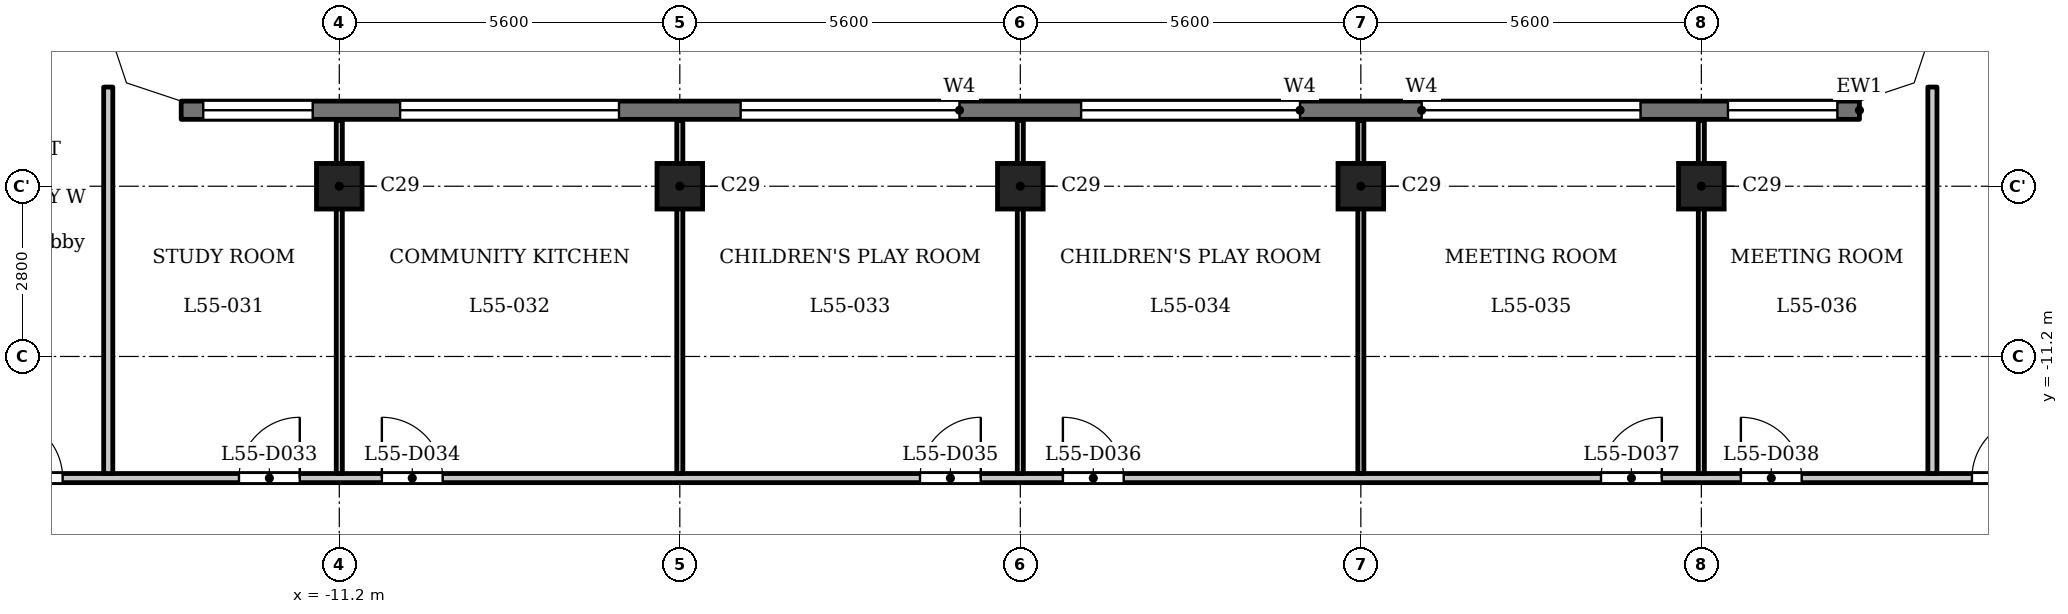
"""IFC4 building model, lengths in metres.
Left out: names, types, materials, properties, quantities, classifications, styles, units other than length and angle.
Written with IfcOpenShell. Run it as: python <this file> out.ifc"""

import sys

from ifc_helpers import new_model, si_unit, direction, frame, frame_2d, origin, origin_2d, place, context, subcontext, project, spatial, polyline, rectangle, outline, extrude, element, fill, save


model = new_model("IFC4")
c1 = context("Model", 3, precision=1e-05, world=origin(), true_north=direction((0.0, 1.0)))
c2 = subcontext(c1, "Body", "Model", "MODEL_VIEW")
j1 = project(units=[si_unit("LENGTHUNIT", "METRE"), si_unit("PLANEANGLEUNIT", "RADIAN")], contexts=[c1])
p1 = place(None, origin())
s1 = spatial("IfcSite", under=j1, at=p1, CompositionType="ELEMENT")
p2 = place(p1, origin())
s2 = spatial("IfcBuilding", under=s1, at=p2, CompositionType="ELEMENT")
p3 = place(p2, frame((0.0, 0.0, 213.4)))
s3 = spatial("IfcBuildingStorey", under=s2, at=p3, CompositionType="ELEMENT", Elevation=213.4)
for number, where, z_axis, x_axis in (
    (1, (-11.2, -8.4, 0.0), (0.0, 0.0, 1.0), (1.0, 0.0, 0.0)),
    (2, (-5.6, -8.4, 0.0), (0.0, 0.0, 1.0), (1.0, 0.0, 0.0)),
    (3, (0.0, -8.4, 0.0), (0.0, 0.0, 1.0), (1.0, 0.0, 0.0)),
    (4, (5.6, -8.4, 0.0), (0.0, 0.0, 1.0), (1.0, 0.0, 0.0)),
    (5, (11.2, -8.4, 0.0), (0.0, 0.0, 1.0), (1.0, 0.0, 0.0)),
):
    element("IfcColumn", number, at=place(p3, frame(where, z_axis=z_axis, x_axis=x_axis)), inside=s3, PredefinedType="COLUMN", context=c2, shape_type="SweptSolid", body=[
        extrude(rectangle(XDim=0.75, YDim=0.75, at=origin_2d()), origin(), (0.0, 0.0, 1.0), 3.5),
    ])
p4 = place(p3, frame((13.8, -7.15, 0.0), z_axis=(0.0, 0.0, 1.0), x_axis=(-1.0, 0.0, 0.0)))
e6 = element("IfcWall", 6, at=p4, inside=s3, PredefinedType="SOLIDWALL", context=c2, shape_type="SweptSolid", body=[
    extrude(rectangle(XDim=27.6, YDim=0.3, at=frame_2d((13.8, 0.0))), origin(), (0.0, 0.0, 1.0), 3.2),
])
p5 = place(p4, frame((0.363, 0.0, 0.9)))
e7 = element("IfcOpeningElement", 7, at=p5, cuts=e6, PredefinedType="OPENING", context=c2, shape_type="SweptSolid", body=[
    extrude(rectangle(XDim=1.8, YDim=1.25, at=frame_2d((0.9, 0.625))), frame((0.0, 0.16, 0.0), z_axis=(0.0, -1.0, 0.0), x_axis=(1.0, 0.0, 0.0)), (0.0, 0.0, 1.0), 0.32),
])
p6 = place(p4, frame((3.6, 0.0, 1.2)))
e8 = element("IfcOpeningElement", 8, at=p6, cuts=e6, PredefinedType="OPENING", context=c2, shape_type="SweptSolid", body=[
    extrude(rectangle(XDim=3.6, YDim=0.95, at=frame_2d((1.8, 0.475))), frame((0.0, 0.16, 0.0), z_axis=(0.0, -1.0, 0.0), x_axis=(1.0, 0.0, 0.0)), (0.0, 0.0, 1.0), 0.32),
])
p7 = place(p4, frame((9.2, 0.0, 1.2)))
e9 = element("IfcOpeningElement", 9, at=p7, cuts=e6, PredefinedType="OPENING", context=c2, shape_type="SweptSolid", body=[
    extrude(rectangle(XDim=3.6, YDim=0.95, at=frame_2d((1.8, 0.475))), frame((0.0, 0.16, 0.0), z_axis=(0.0, -1.0, 0.0), x_axis=(1.0, 0.0, 0.0)), (0.0, 0.0, 1.0), 0.32),
])
p8 = place(p4, frame((14.8, 0.0, 1.2)))
e10 = element("IfcOpeningElement", 10, at=p8, cuts=e6, PredefinedType="OPENING", context=c2, shape_type="SweptSolid", body=[
    extrude(rectangle(XDim=3.6, YDim=0.95, at=frame_2d((1.8, 0.475))), frame((0.0, 0.16, 0.0), z_axis=(0.0, -1.0, 0.0), x_axis=(1.0, 0.0, 0.0)), (0.0, 0.0, 1.0), 0.32),
])
p9 = place(p4, frame((20.4, 0.0, 1.2)))
e11 = element("IfcOpeningElement", 11, at=p9, cuts=e6, PredefinedType="OPENING", context=c2, shape_type="SweptSolid", body=[
    extrude(rectangle(XDim=3.6, YDim=0.95, at=frame_2d((1.8, 0.475))), frame((0.0, 0.16, 0.0), z_axis=(0.0, -1.0, 0.0), x_axis=(1.0, 0.0, 0.0)), (0.0, 0.0, 1.0), 0.32),
])
p10 = place(p4, frame((25.438, 0.0, 0.9)))
e12 = element("IfcOpeningElement", 12, at=p10, cuts=e6, PredefinedType="OPENING", context=c2, shape_type="SweptSolid", body=[
    extrude(rectangle(XDim=1.8, YDim=1.25, at=frame_2d((0.9, 0.625))), frame((0.0, 0.16, 0.0), z_axis=(0.0, -1.0, 0.0), x_axis=(1.0, 0.0, 0.0)), (0.0, 0.0, 1.0), 0.32),
])
p11 = place(p3, frame((-17.4, -13.2, 0.0), z_axis=(0.0, 0.0, 1.0), x_axis=(1.0, 0.0, 0.0)))
e13 = element("IfcWall", 13, at=p11, inside=s3, PredefinedType="PARTITIONING", context=c2, shape_type="SweptSolid", body=[
    extrude(rectangle(XDim=34.8, YDim=0.15, at=frame_2d((17.4, 0.0))), origin(), (0.0, 0.0, 1.0), 3.2),
])
p12 = place(p11, frame((0.65, 0.0, 0.0)))
e14 = element("IfcOpeningElement", 14, at=p12, cuts=e13, PredefinedType="OPENING", context=c2, shape_type="SweptSolid", body=[
    extrude(rectangle(XDim=1.0, YDim=2.1, at=frame_2d((0.5, 1.05))), frame((0.0, 0.085, 0.0), z_axis=(0.0, -1.0, 0.0), x_axis=(1.0, 0.0, 0.0)), (0.0, 0.0, 1.0), 0.17),
])
p13 = place(p11, frame((33.05, 0.0, 0.0)))
e15 = element("IfcOpeningElement", 15, at=p13, cuts=e13, PredefinedType="OPENING", context=c2, shape_type="SweptSolid", body=[
    extrude(rectangle(XDim=1.0, YDim=2.1, at=frame_2d((0.5, 1.05))), frame((0.0, 0.085, 0.0), z_axis=(0.0, -1.0, 0.0), x_axis=(1.0, 0.0, 0.0)), (0.0, 0.0, 1.0), 0.17),
])
p14 = place(p11, frame((4.55, 0.0, 0.0)))
e16 = element("IfcOpeningElement", 16, at=p14, cuts=e13, PredefinedType="OPENING", context=c2, shape_type="SweptSolid", body=[
    extrude(rectangle(XDim=1.0, YDim=2.1, at=frame_2d((0.5, 1.05))), frame((0.0, 0.085, 0.0), z_axis=(0.0, -1.0, 0.0), x_axis=(1.0, 0.0, 0.0)), (0.0, 0.0, 1.0), 0.17),
])
p15 = place(p11, frame((6.9, 0.0, 0.0)))
e17 = element("IfcOpeningElement", 17, at=p15, cuts=e13, PredefinedType="OPENING", context=c2, shape_type="SweptSolid", body=[
    extrude(rectangle(XDim=1.0, YDim=2.1, at=frame_2d((0.5, 1.05))), frame((0.0, 0.085, 0.0), z_axis=(0.0, -1.0, 0.0), x_axis=(1.0, 0.0, 0.0)), (0.0, 0.0, 1.0), 0.17),
])
p16 = place(p11, frame((15.75, 0.0, 0.0)))
e18 = element("IfcOpeningElement", 18, at=p16, cuts=e13, PredefinedType="OPENING", context=c2, shape_type="SweptSolid", body=[
    extrude(rectangle(XDim=1.0, YDim=2.1, at=frame_2d((0.5, 1.05))), frame((0.0, 0.085, 0.0), z_axis=(0.0, -1.0, 0.0), x_axis=(1.0, 0.0, 0.0)), (0.0, 0.0, 1.0), 0.17),
])
p17 = place(p11, frame((18.1, 0.0, 0.0)))
e19 = element("IfcOpeningElement", 19, at=p17, cuts=e13, PredefinedType="OPENING", context=c2, shape_type="SweptSolid", body=[
    extrude(rectangle(XDim=1.0, YDim=2.1, at=frame_2d((0.5, 1.05))), frame((0.0, 0.085, 0.0), z_axis=(0.0, -1.0, 0.0), x_axis=(1.0, 0.0, 0.0)), (0.0, 0.0, 1.0), 0.17),
])
p18 = place(p11, frame((26.95, 0.0, 0.0)))
e20 = element("IfcOpeningElement", 20, at=p18, cuts=e13, PredefinedType="OPENING", context=c2, shape_type="SweptSolid", body=[
    extrude(rectangle(XDim=1.0, YDim=2.1, at=frame_2d((0.5, 1.05))), frame((0.0, 0.085, 0.0), z_axis=(0.0, -1.0, 0.0), x_axis=(1.0, 0.0, 0.0)), (0.0, 0.0, 1.0), 0.17),
])
p19 = place(p11, frame((29.25, 0.0, 0.0)))
e21 = element("IfcOpeningElement", 21, at=p19, cuts=e13, PredefinedType="OPENING", context=c2, shape_type="SweptSolid", body=[
    extrude(rectangle(XDim=1.0, YDim=2.1, at=frame_2d((0.5, 1.05))), frame((0.0, 0.085, 0.0), z_axis=(0.0, -1.0, 0.0), x_axis=(1.0, 0.0, 0.0)), (0.0, 0.0, 1.0), 0.17),
])
p20 = place(p3, frame((-15.0, -13.125, 0.0), z_axis=(0.0, 0.0, 1.0), x_axis=(0.0, 1.0, 0.0)))
e22 = element("IfcWall", 22, at=p20, inside=s3, PredefinedType="PARTITIONING", context=c2, shape_type="SweptSolid", body=[
    extrude(rectangle(XDim=6.356, YDim=0.15, at=frame_2d((3.178, 0.0))), origin(), (0.0, 0.0, 1.0), 3.2),
])
for number, where, z_axis, x_axis in (
    (23, (-11.2, -13.125, 0.0), (0.0, 0.0, 1.0), (0.0, 1.0, 0.0)),
    (24, (-5.6, -13.125, 0.0), (0.0, 0.0, 1.0), (0.0, 1.0, 0.0)),
    (25, (0.0, -13.125, 0.0), (0.0, 0.0, 1.0), (0.0, 1.0, 0.0)),
    (26, (5.6, -13.125, 0.0), (0.0, 0.0, 1.0), (0.0, 1.0, 0.0)),
    (27, (11.2, -13.125, 0.0), (0.0, 0.0, 1.0), (0.0, 1.0, 0.0)),
):
    element("IfcWall", number, at=place(p3, frame(where, z_axis=z_axis, x_axis=x_axis)), inside=s3, PredefinedType="PARTITIONING", context=c2, shape_type="SweptSolid", body=[
        extrude(rectangle(XDim=5.805, YDim=0.1, at=frame_2d((2.902, 0.0))), origin(), (0.0, 0.0, 1.0), 3.2),
    ])
p21 = place(p3, frame((15.0, -13.125, 0.0), z_axis=(0.0, 0.0, 1.0), x_axis=(0.0, 1.0, 0.0)))
e28 = element("IfcWall", 28, at=p21, inside=s3, PredefinedType="PARTITIONING", context=c2, shape_type="SweptSolid", body=[
    extrude(rectangle(XDim=6.356, YDim=0.15, at=frame_2d((3.178, 0.0))), origin(), (0.0, 0.0, 1.0), 3.2),
])
p22 = place(p3, origin())
e29 = element("IfcWall", 29, at=p22, inside=s3, PredefinedType="SOLIDWALL", context=c2, shape_type="SweptSolid", body=[
    extrude(outline(polyline([(14.937, -6.937), (15.3, -5.849), (15.3, -5.8), (15.0, -5.8), (14.7, -6.7), (13.8, -7.0), (13.8, -7.3), (13.849, -7.3), (14.937, -6.937)])), origin(), (0.0, 0.0, 1.0), 3.2),
])
e30 = element("IfcWall", 30, at=p22, inside=s3, PredefinedType="SOLIDWALL", context=c2, shape_type="SweptSolid", body=[
    extrude(outline(polyline([(-14.937, -6.937), (-13.849, -7.3), (-13.8, -7.3), (-13.8, -7.0), (-14.7, -6.7), (-15.0, -5.8), (-15.3, -5.8), (-15.3, -5.849), (-14.937, -6.937)])), origin(), (0.0, 0.0, 1.0), 3.2),
])
p23 = place(p12, origin())
e31 = element("IfcDoor", 31, at=p23, inside=s3, OperationType="SINGLE_SWING_RIGHT", PredefinedType="DOOR", context=c2, shape_type="SweptSolid", body=[
    extrude(rectangle(XDim=1.0, YDim=2.1, at=frame_2d((0.5, 1.05))), frame((0.0, 0.025, 0.0), z_axis=(0.0, -1.0, 0.0), x_axis=(1.0, 0.0, 0.0)), (0.0, 0.0, 1.0), 0.05),
])
fill(e14, e31)
p24 = place(p13, origin())
e32 = element("IfcDoor", 32, at=p24, inside=s3, OperationType="SINGLE_SWING_LEFT", PredefinedType="DOOR", context=c2, shape_type="SweptSolid", body=[
    extrude(rectangle(XDim=1.0, YDim=2.1, at=frame_2d((0.5, 1.05))), frame((0.0, 0.025, 0.0), z_axis=(0.0, -1.0, 0.0), x_axis=(1.0, 0.0, 0.0)), (0.0, 0.0, 1.0), 0.05),
])
fill(e15, e32)
p25 = place(p14, origin())
e33 = element("IfcDoor", 33, at=p25, inside=s3, OperationType="SINGLE_SWING_LEFT", PredefinedType="DOOR", context=c2, shape_type="SweptSolid", body=[
    extrude(rectangle(XDim=1.0, YDim=2.1, at=frame_2d((0.5, 1.05))), frame((0.0, 0.025, 0.0), z_axis=(0.0, -1.0, 0.0), x_axis=(1.0, 0.0, 0.0)), (0.0, 0.0, 1.0), 0.05),
])
fill(e16, e33)
p26 = place(p15, origin())
e34 = element("IfcDoor", 34, at=p26, inside=s3, OperationType="SINGLE_SWING_RIGHT", PredefinedType="DOOR", context=c2, shape_type="SweptSolid", body=[
    extrude(rectangle(XDim=1.0, YDim=2.1, at=frame_2d((0.5, 1.05))), frame((0.0, 0.025, 0.0), z_axis=(0.0, -1.0, 0.0), x_axis=(1.0, 0.0, 0.0)), (0.0, 0.0, 1.0), 0.05),
])
fill(e17, e34)
p27 = place(p16, origin())
e35 = element("IfcDoor", 35, at=p27, inside=s3, OperationType="SINGLE_SWING_LEFT", PredefinedType="DOOR", context=c2, shape_type="SweptSolid", body=[
    extrude(rectangle(XDim=1.0, YDim=2.1, at=frame_2d((0.5, 1.05))), frame((0.0, 0.025, 0.0), z_axis=(0.0, -1.0, 0.0), x_axis=(1.0, 0.0, 0.0)), (0.0, 0.0, 1.0), 0.05),
])
fill(e18, e35)
p28 = place(p17, origin())
e36 = element("IfcDoor", 36, at=p28, inside=s3, OperationType="SINGLE_SWING_RIGHT", PredefinedType="DOOR", context=c2, shape_type="SweptSolid", body=[
    extrude(rectangle(XDim=1.0, YDim=2.1, at=frame_2d((0.5, 1.05))), frame((0.0, 0.025, 0.0), z_axis=(0.0, -1.0, 0.0), x_axis=(1.0, 0.0, 0.0)), (0.0, 0.0, 1.0), 0.05),
])
fill(e19, e36)
p29 = place(p18, origin())
e37 = element("IfcDoor", 37, at=p29, inside=s3, OperationType="SINGLE_SWING_LEFT", PredefinedType="DOOR", context=c2, shape_type="SweptSolid", body=[
    extrude(rectangle(XDim=1.0, YDim=2.1, at=frame_2d((0.5, 1.05))), frame((0.0, 0.025, 0.0), z_axis=(0.0, -1.0, 0.0), x_axis=(1.0, 0.0, 0.0)), (0.0, 0.0, 1.0), 0.05),
])
fill(e20, e37)
p30 = place(p19, origin())
e38 = element("IfcDoor", 38, at=p30, inside=s3, OperationType="SINGLE_SWING_RIGHT", PredefinedType="DOOR", context=c2, shape_type="SweptSolid", body=[
    extrude(rectangle(XDim=1.0, YDim=2.1, at=frame_2d((0.5, 1.05))), frame((0.0, 0.025, 0.0), z_axis=(0.0, -1.0, 0.0), x_axis=(1.0, 0.0, 0.0)), (0.0, 0.0, 1.0), 0.05),
])
fill(e21, e38)
p31 = place(p5, origin())
e39 = element("IfcWindow", 39, at=p31, inside=s3, PartitioningType="SINGLE_PANEL", PredefinedType="WINDOW", context=c2, shape_type="SweptSolid", body=[
    extrude(rectangle(XDim=1.8, YDim=1.25, at=frame_2d((0.9, 0.625))), frame((0.0, 0.03, 0.0), z_axis=(0.0, -1.0, 0.0), x_axis=(1.0, 0.0, 0.0)), (0.0, 0.0, 1.0), 0.06),
])
fill(e7, e39)
p32 = place(p6, origin())
e40 = element("IfcWindow", 40, at=p32, inside=s3, PartitioningType="SINGLE_PANEL", PredefinedType="WINDOW", context=c2, shape_type="SweptSolid", body=[
    extrude(rectangle(XDim=3.6, YDim=0.95, at=frame_2d((1.8, 0.475))), frame((0.0, 0.03, 0.0), z_axis=(0.0, -1.0, 0.0), x_axis=(1.0, 0.0, 0.0)), (0.0, 0.0, 1.0), 0.06),
])
fill(e8, e40)
p33 = place(p7, origin())
e41 = element("IfcWindow", 41, at=p33, inside=s3, PartitioningType="SINGLE_PANEL", PredefinedType="WINDOW", context=c2, shape_type="SweptSolid", body=[
    extrude(rectangle(XDim=3.6, YDim=0.95, at=frame_2d((1.8, 0.475))), frame((0.0, 0.03, 0.0), z_axis=(0.0, -1.0, 0.0), x_axis=(1.0, 0.0, 0.0)), (0.0, 0.0, 1.0), 0.06),
])
fill(e9, e41)
p34 = place(p8, origin())
e42 = element("IfcWindow", 42, at=p34, inside=s3, PartitioningType="SINGLE_PANEL", PredefinedType="WINDOW", context=c2, shape_type="SweptSolid", body=[
    extrude(rectangle(XDim=3.6, YDim=0.95, at=frame_2d((1.8, 0.475))), frame((0.0, 0.03, 0.0), z_axis=(0.0, -1.0, 0.0), x_axis=(1.0, 0.0, 0.0)), (0.0, 0.0, 1.0), 0.06),
])
fill(e10, e42)
p35 = place(p9, origin())
e43 = element("IfcWindow", 43, at=p35, inside=s3, PartitioningType="SINGLE_PANEL", PredefinedType="WINDOW", context=c2, shape_type="SweptSolid", body=[
    extrude(rectangle(XDim=3.6, YDim=0.95, at=frame_2d((1.8, 0.475))), frame((0.0, 0.03, 0.0), z_axis=(0.0, -1.0, 0.0), x_axis=(1.0, 0.0, 0.0)), (0.0, 0.0, 1.0), 0.06),
])
fill(e11, e43)
p36 = place(p10, origin())
e44 = element("IfcWindow", 44, at=p36, inside=s3, PartitioningType="SINGLE_PANEL", PredefinedType="WINDOW", context=c2, shape_type="SweptSolid", body=[
    extrude(rectangle(XDim=1.8, YDim=1.25, at=frame_2d((0.9, 0.625))), frame((0.0, 0.03, 0.0), z_axis=(0.0, -1.0, 0.0), x_axis=(1.0, 0.0, 0.0)), (0.0, 0.0, 1.0), 0.06),
])
fill(e12, e44)
save(model, sys.argv[1])
